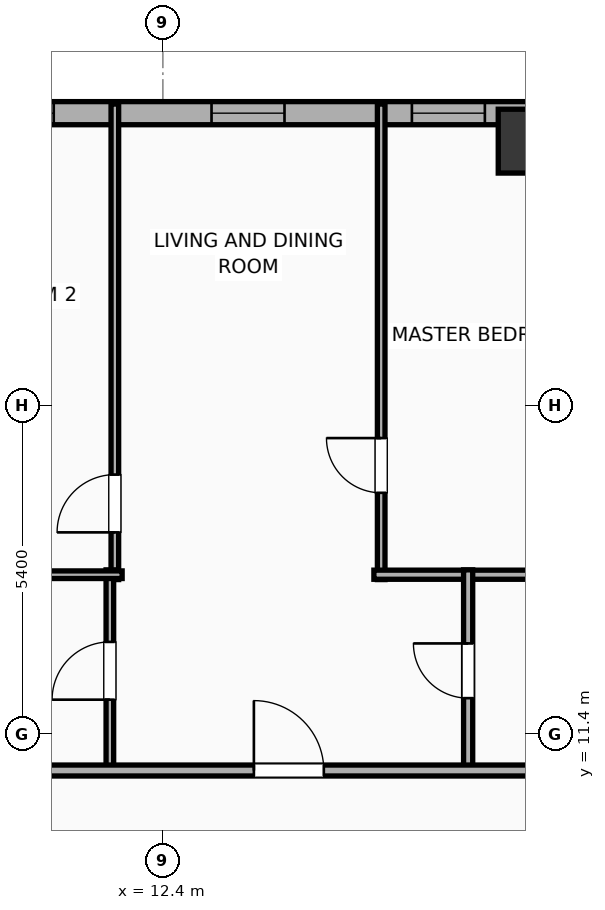
"""IFC4 building model, lengths in metres.
Left out: names, types, materials, properties, quantities, classifications, styles, units other than length and angle.
Written with IfcOpenShell. Run it as: python <this file> out.ifc"""

import sys

from ifc_helpers import new_model, si_unit, direction, frame, frame_2d, origin, origin_2d, place, context, subcontext, project, spatial, rectangle, hollow_rectangle, extrude, element, fill, save


model = new_model("IFC4")
c1 = context("Model", 3, precision=1e-05, world=origin(), true_north=direction((0.0, 1.0)))
c2 = subcontext(c1, "Body", "Model", "MODEL_VIEW")
j1 = project(units=[si_unit("LENGTHUNIT", "METRE"), si_unit("PLANEANGLEUNIT", "RADIAN")], contexts=[c1])
p1 = place(None, origin())
s1 = spatial("IfcSite", under=j1, at=p1, CompositionType="ELEMENT")
p2 = place(p1, origin())
s2 = spatial("IfcBuilding", under=s1, at=p2, CompositionType="ELEMENT")
p3 = place(p2, frame((0.0, 0.0, 132.6)))
s3 = spatial("IfcBuildingStorey", under=s2, at=p3, CompositionType="ELEMENT", Elevation=132.6)
p4 = place(p3, frame((18.44, 21.15, 0.0), z_axis=(0.0, 0.0, 1.0), x_axis=(1.0, 0.0, 0.0)))
e1 = element("IfcColumn", 1, at=p4, inside=s3, PredefinedType="COLUMN", context=c2, shape_type="SweptSolid", body=[
    extrude(hollow_rectangle(XDim=1.05, YDim=1.05, WallThickness=0.036, at=origin_2d()), origin(), (0.0, 0.0, 1.0), 3.9),
])
p5 = place(p3, frame((-25.381, 21.61, 0.0), z_axis=(0.0, 0.0, 1.0), x_axis=(1.0, 0.0, 0.0)))
e2 = element("IfcWall", 2, at=p5, inside=s3, PredefinedType="ELEMENTEDWALL", context=c2, shape_type="SweptSolid", body=[
    extrude(rectangle(XDim=54.763, YDim=0.38, at=frame_2d((27.381, 0.0))), origin(), (0.0, 0.0, 1.0), 3.65),
])
p6 = place(p5, frame((5.645, 0.0, 0.75)))
e3 = element("IfcOpeningElement", 3, at=p6, cuts=e2, PredefinedType="OPENING", context=c2, shape_type="SweptSolid", body=[
    extrude(rectangle(XDim=2.4, YDim=2.1, at=frame_2d((1.2, 1.05))), frame((0.0, 0.2, 0.0), z_axis=(0.0, -1.0, 0.0), x_axis=(1.0, 0.0, 0.0)), (0.0, 0.0, 1.0), 0.4),
])
p7 = place(p5, frame((45.067, 0.0, 0.75)))
e4 = element("IfcOpeningElement", 4, at=p7, cuts=e2, PredefinedType="OPENING", context=c2, shape_type="SweptSolid", body=[
    extrude(rectangle(XDim=2.4, YDim=2.1, at=frame_2d((1.2, 1.05))), frame((0.0, 0.2, 0.0), z_axis=(0.0, -1.0, 0.0), x_axis=(1.0, 0.0, 0.0)), (0.0, 0.0, 1.0), 0.4),
])
p8 = place(p5, frame((1.831, 0.0, 0.75)))
e5 = element("IfcOpeningElement", 5, at=p8, cuts=e2, PredefinedType="OPENING", context=c2, shape_type="SweptSolid", body=[
    extrude(rectangle(XDim=1.2, YDim=2.05, at=frame_2d((0.6, 1.025))), frame((0.0, 0.2, 0.0), z_axis=(0.0, -1.0, 0.0), x_axis=(1.0, 0.0, 0.0)), (0.0, 0.0, 1.0), 0.4),
])
p9 = place(p5, frame((8.996, 0.0, 0.75)))
e6 = element("IfcOpeningElement", 6, at=p9, cuts=e2, PredefinedType="OPENING", context=c2, shape_type="SweptSolid", body=[
    extrude(rectangle(XDim=1.2, YDim=2.05, at=frame_2d((0.6, 1.025))), frame((0.0, 0.2, 0.0), z_axis=(0.0, -1.0, 0.0), x_axis=(1.0, 0.0, 0.0)), (0.0, 0.0, 1.0), 0.4),
])
p10 = place(p5, frame((15.102, 0.0, 0.75)))
e7 = element("IfcOpeningElement", 7, at=p10, cuts=e2, PredefinedType="OPENING", context=c2, shape_type="SweptSolid", body=[
    extrude(rectangle(XDim=1.2, YDim=2.05, at=frame_2d((0.6, 1.025))), frame((0.0, 0.2, 0.0), z_axis=(0.0, -1.0, 0.0), x_axis=(1.0, 0.0, 0.0)), (0.0, 0.0, 1.0), 0.4),
])
p11 = place(p5, frame((12.352, 0.0, 0.75)))
e8 = element("IfcOpeningElement", 8, at=p11, cuts=e2, PredefinedType="OPENING", context=c2, shape_type="SweptSolid", body=[
    extrude(rectangle(XDim=1.2, YDim=2.05, at=frame_2d((0.6, 1.025))), frame((0.0, 0.2, 0.0), z_axis=(0.0, -1.0, 0.0), x_axis=(1.0, 0.0, 0.0)), (0.0, 0.0, 1.0), 0.4),
])
p12 = place(p5, frame((19.936, 0.0, 0.75)))
e9 = element("IfcOpeningElement", 9, at=p12, cuts=e2, PredefinedType="OPENING", context=c2, shape_type="SweptSolid", body=[
    extrude(rectangle(XDim=1.2, YDim=2.05, at=frame_2d((0.6, 1.025))), frame((0.0, 0.2, 0.0), z_axis=(0.0, -1.0, 0.0), x_axis=(1.0, 0.0, 0.0)), (0.0, 0.0, 1.0), 0.4),
])
p13 = place(p5, frame((17.786, 0.0, 0.75)))
e10 = element("IfcOpeningElement", 10, at=p13, cuts=e2, PredefinedType="OPENING", context=c2, shape_type="SweptSolid", body=[
    extrude(rectangle(XDim=1.2, YDim=2.05, at=frame_2d((0.6, 1.025))), frame((0.0, 0.2, 0.0), z_axis=(0.0, -1.0, 0.0), x_axis=(1.0, 0.0, 0.0)), (0.0, 0.0, 1.0), 0.4),
])
p14 = place(p5, frame((23.826, 0.0, 0.75)))
e11 = element("IfcOpeningElement", 11, at=p14, cuts=e2, PredefinedType="OPENING", context=c2, shape_type="SweptSolid", body=[
    extrude(rectangle(XDim=1.2, YDim=2.05, at=frame_2d((0.6, 1.025))), frame((0.0, 0.2, 0.0), z_axis=(0.0, -1.0, 0.0), x_axis=(1.0, 0.0, 0.0)), (0.0, 0.0, 1.0), 0.4),
])
p15 = place(p5, frame((26.576, 0.0, 0.75)))
e12 = element("IfcOpeningElement", 12, at=p15, cuts=e2, PredefinedType="OPENING", context=c2, shape_type="SweptSolid", body=[
    extrude(rectangle(XDim=1.2, YDim=2.05, at=frame_2d((0.6, 1.025))), frame((0.0, 0.2, 0.0), z_axis=(0.0, -1.0, 0.0), x_axis=(1.0, 0.0, 0.0)), (0.0, 0.0, 1.0), 0.4),
])
p16 = place(p5, frame((30.431, 0.0, 0.75)))
e13 = element("IfcOpeningElement", 13, at=p16, cuts=e2, PredefinedType="OPENING", context=c2, shape_type="SweptSolid", body=[
    extrude(rectangle(XDim=1.2, YDim=2.05, at=frame_2d((0.6, 1.025))), frame((0.0, 0.2, 0.0), z_axis=(0.0, -1.0, 0.0), x_axis=(1.0, 0.0, 0.0)), (0.0, 0.0, 1.0), 0.4),
])
p17 = place(p5, frame((38.581, 0.0, 0.75)))
e14 = element("IfcOpeningElement", 14, at=p17, cuts=e2, PredefinedType="OPENING", context=c2, shape_type="SweptSolid", body=[
    extrude(rectangle(XDim=1.2, YDim=2.05, at=frame_2d((0.6, 1.025))), frame((0.0, 0.2, 0.0), z_axis=(0.0, -1.0, 0.0), x_axis=(1.0, 0.0, 0.0)), (0.0, 0.0, 1.0), 0.4),
])
p18 = place(p5, frame((34.786, 0.0, 0.75)))
e15 = element("IfcOpeningElement", 15, at=p18, cuts=e2, PredefinedType="OPENING", context=c2, shape_type="SweptSolid", body=[
    extrude(rectangle(XDim=1.2, YDim=2.05, at=frame_2d((0.6, 1.025))), frame((0.0, 0.2, 0.0), z_axis=(0.0, -1.0, 0.0), x_axis=(1.0, 0.0, 0.0)), (0.0, 0.0, 1.0), 0.4),
])
p19 = place(p5, frame((41.876, 0.0, 0.75)))
e16 = element("IfcOpeningElement", 16, at=p19, cuts=e2, PredefinedType="OPENING", context=c2, shape_type="SweptSolid", body=[
    extrude(rectangle(XDim=1.2, YDim=2.05, at=frame_2d((0.6, 1.025))), frame((0.0, 0.2, 0.0), z_axis=(0.0, -1.0, 0.0), x_axis=(1.0, 0.0, 0.0)), (0.0, 0.0, 1.0), 0.4),
])
p20 = place(p5, frame((49.385, 0.0, 0.75)))
e17 = element("IfcOpeningElement", 17, at=p20, cuts=e2, PredefinedType="OPENING", context=c2, shape_type="SweptSolid", body=[
    extrude(rectangle(XDim=1.2, YDim=2.05, at=frame_2d((0.6, 1.025))), frame((0.0, 0.2, 0.0), z_axis=(0.0, -1.0, 0.0), x_axis=(1.0, 0.0, 0.0)), (0.0, 0.0, 1.0), 0.4),
])
p21 = place(p5, frame((52.181, 0.0, 0.75)))
e18 = element("IfcOpeningElement", 18, at=p21, cuts=e2, PredefinedType="OPENING", context=c2, shape_type="SweptSolid", body=[
    extrude(rectangle(XDim=1.2, YDim=2.05, at=frame_2d((0.6, 1.025))), frame((0.0, 0.2, 0.0), z_axis=(0.0, -1.0, 0.0), x_axis=(1.0, 0.0, 0.0)), (0.0, 0.0, 1.0), 0.4),
])
p22 = place(p3, frame((11.61, 13.94, 0.0), z_axis=(0.0, 0.0, 1.0), x_axis=(0.0, 1.0, 0.0)))
e19 = element("IfcWall", 19, at=p22, inside=s3, PredefinedType="PARTITIONING", context=c2, shape_type="SweptSolid", body=[
    extrude(rectangle(XDim=7.82, YDim=0.125, at=frame_2d((3.91, 0.0))), origin(), (0.0, 0.0, 1.0), 3.65),
])
p23 = place(p22, frame((0.776, 0.0, 0.0)))
e20 = element("IfcOpeningElement", 20, at=p23, cuts=e19, PredefinedType="OPENING", context=c2, shape_type="SweptSolid", body=[
    extrude(rectangle(XDim=0.95, YDim=2.05, at=frame_2d((0.475, 1.025))), frame((0.0, 0.073, 0.0), z_axis=(0.0, -1.0, 0.0), x_axis=(1.0, 0.0, 0.0)), (0.0, 0.0, 1.0), 0.145),
])
p24 = place(p3, frame((15.99, 13.94, 0.0), z_axis=(0.0, 0.0, 1.0), x_axis=(0.0, 1.0, 0.0)))
e21 = element("IfcWall", 21, at=p24, inside=s3, PredefinedType="PARTITIONING", context=c2, shape_type="SweptSolid", body=[
    extrude(rectangle(XDim=7.82, YDim=0.125, at=frame_2d((3.91, 0.0))), origin(), (0.0, 0.0, 1.0), 3.65),
])
p25 = place(p24, frame((1.427, 0.0, 0.0)))
e22 = element("IfcOpeningElement", 22, at=p25, cuts=e21, PredefinedType="OPENING", context=c2, shape_type="SweptSolid", body=[
    extrude(rectangle(XDim=0.9, YDim=2.05, at=frame_2d((0.45, 1.025))), frame((0.0, 0.073, 0.0), z_axis=(0.0, -1.0, 0.0), x_axis=(1.0, 0.0, 0.0)), (0.0, 0.0, 1.0), 0.145),
])
p26 = place(p3, frame((15.87, 14.02, 0.0), z_axis=(0.0, 0.0, 1.0), x_axis=(1.0, 0.0, 0.0)))
e23 = element("IfcWall", 23, at=p26, inside=s3, PredefinedType="PLUMBINGWALL", context=c2, shape_type="SweptSolid", body=[
    extrude(rectangle(XDim=3.605, YDim=0.15, at=frame_2d((1.802, 0.0))), origin(), (0.0, 0.0, 1.0), 3.65),
])
p27 = place(p3, frame((11.528, 10.78, 0.0), z_axis=(0.0, 0.0, 1.0), x_axis=(0.0, 1.0, 0.0)))
e24 = element("IfcWall", 24, at=p27, inside=s3, PredefinedType="PARTITIONING", context=c2, shape_type="SweptSolid", body=[
    extrude(rectangle(XDim=3.32, YDim=0.125, at=frame_2d((1.66, 0.0))), origin(), (0.0, 0.0, 1.0), 3.65),
])
p28 = place(p27, frame((1.185, 0.0, 0.0)))
e25 = element("IfcOpeningElement", 25, at=p28, cuts=e24, PredefinedType="OPENING", context=c2, shape_type="SweptSolid", body=[
    extrude(rectangle(XDim=0.95, YDim=2.05, at=frame_2d((0.475, 1.025))), frame((0.0, 0.073, 0.0), z_axis=(0.0, -1.0, 0.0), x_axis=(1.0, 0.0, 0.0)), (0.0, 0.0, 1.0), 0.145),
])
p29 = place(p3, frame((8.14, 14.02, 0.0), z_axis=(0.0, 0.0, 1.0), x_axis=(1.0, 0.0, 0.0)))
e26 = element("IfcWall", 26, at=p29, inside=s3, PredefinedType="PARTITIONING", context=c2, shape_type="SweptSolid", body=[
    extrude(rectangle(XDim=3.59, YDim=0.125, at=frame_2d((1.795, 0.0))), origin(), (0.0, 0.0, 1.0), 3.65),
])
p30 = place(p3, frame((17.42, 10.78, 0.0), z_axis=(0.0, 0.0, 1.0), x_axis=(0.0, 1.0, 0.0)))
e27 = element("IfcWall", 27, at=p30, inside=s3, PredefinedType="PLUMBINGWALL", context=c2, shape_type="SweptSolid", body=[
    extrude(rectangle(XDim=3.32, YDim=0.15, at=frame_2d((1.66, 0.0))), origin(), (0.0, 0.0, 1.0), 3.65),
])
p31 = place(p30, frame((1.21, 0.0, 0.0)))
e28 = element("IfcOpeningElement", 28, at=p31, cuts=e27, PredefinedType="OPENING", context=c2, shape_type="SweptSolid", body=[
    extrude(rectangle(XDim=0.9, YDim=2.05, at=frame_2d((0.45, 1.025))), frame((0.0, 0.085, 0.0), z_axis=(0.0, -1.0, 0.0), x_axis=(1.0, 0.0, 0.0)), (0.0, 0.0, 1.0), 0.17),
])
p32 = place(p3, frame((-29.21, 10.8, 0.0), z_axis=(0.0, 0.0, 1.0), x_axis=(1.0, 0.0, 0.0)))
e29 = element("IfcWall", 29, at=p32, inside=s3, PredefinedType="PARTITIONING", context=c2, shape_type="SweptSolid", body=[
    extrude(rectangle(XDim=62.42, YDim=0.18, at=frame_2d((31.21, 0.0))), origin(), (0.0, 0.0, 1.0), 3.65),
])
p33 = place(p32, frame((3.457, 0.0, 0.0)))
e30 = element("IfcOpeningElement", 30, at=p33, cuts=e29, PredefinedType="OPENING", context=c2, shape_type="SweptSolid", body=[
    extrude(rectangle(XDim=1.15, YDim=2.05, at=frame_2d((0.575, 1.025))), frame((0.0, 0.1, 0.0), z_axis=(0.0, -1.0, 0.0), x_axis=(1.0, 0.0, 0.0)), (0.0, 0.0, 1.0), 0.2),
])
p34 = place(p32, frame((11.297, 0.0, 0.0)))
e31 = element("IfcOpeningElement", 31, at=p34, cuts=e29, PredefinedType="OPENING", context=c2, shape_type="SweptSolid", body=[
    extrude(rectangle(XDim=1.15, YDim=2.05, at=frame_2d((0.575, 1.025))), frame((0.0, 0.1, 0.0), z_axis=(0.0, -1.0, 0.0), x_axis=(1.0, 0.0, 0.0)), (0.0, 0.0, 1.0), 0.2),
])
p35 = place(p32, frame((18.925, 0.0, 0.0)))
e32 = element("IfcOpeningElement", 32, at=p35, cuts=e29, PredefinedType="OPENING", context=c2, shape_type="SweptSolid", body=[
    extrude(rectangle(XDim=1.15, YDim=2.05, at=frame_2d((0.575, 1.025))), frame((0.0, 0.1, 0.0), z_axis=(0.0, -1.0, 0.0), x_axis=(1.0, 0.0, 0.0)), (0.0, 0.0, 1.0), 0.2),
])
p36 = place(p32, frame((24.362, 0.0, 0.0)))
e33 = element("IfcOpeningElement", 33, at=p36, cuts=e29, PredefinedType="OPENING", context=c2, shape_type="SweptSolid", body=[
    extrude(rectangle(XDim=1.15, YDim=2.05, at=frame_2d((0.575, 1.025))), frame((0.0, 0.1, 0.0), z_axis=(0.0, -1.0, 0.0), x_axis=(1.0, 0.0, 0.0)), (0.0, 0.0, 1.0), 0.2),
])
p37 = place(p32, frame((27.708, 0.0, 0.0)))
e34 = element("IfcOpeningElement", 34, at=p37, cuts=e29, PredefinedType="OPENING", context=c2, shape_type="SweptSolid", body=[
    extrude(rectangle(XDim=1.15, YDim=2.05, at=frame_2d((0.575, 1.025))), frame((0.0, 0.1, 0.0), z_axis=(0.0, -1.0, 0.0), x_axis=(1.0, 0.0, 0.0)), (0.0, 0.0, 1.0), 0.2),
])
p38 = place(p32, frame((34.618, 0.0, 0.0)))
e35 = element("IfcOpeningElement", 35, at=p38, cuts=e29, PredefinedType="OPENING", context=c2, shape_type="SweptSolid", body=[
    extrude(rectangle(XDim=0.9, YDim=2.05, at=frame_2d((0.45, 1.025))), frame((0.0, 0.1, 0.0), z_axis=(0.0, -1.0, 0.0), x_axis=(1.0, 0.0, 0.0)), (0.0, 0.0, 1.0), 0.2),
])
p39 = place(p32, frame((43.106, 0.0, 0.0)))
e36 = element("IfcOpeningElement", 36, at=p39, cuts=e29, PredefinedType="OPENING", context=c2, shape_type="SweptSolid", body=[
    extrude(rectangle(XDim=1.15, YDim=2.05, at=frame_2d((0.575, 1.025))), frame((0.0, 0.1, 0.0), z_axis=(0.0, -1.0, 0.0), x_axis=(1.0, 0.0, 0.0)), (0.0, 0.0, 1.0), 0.2),
])
p40 = place(p32, frame((51.777, 0.0, 0.0)))
e37 = element("IfcOpeningElement", 37, at=p40, cuts=e29, PredefinedType="OPENING", context=c2, shape_type="SweptSolid", body=[
    extrude(rectangle(XDim=0.9, YDim=2.05, at=frame_2d((0.45, 1.025))), frame((0.0, 0.1, 0.0), z_axis=(0.0, -1.0, 0.0), x_axis=(1.0, 0.0, 0.0)), (0.0, 0.0, 1.0), 0.2),
])
p41 = place(p32, frame((58.718, 0.0, 0.0)))
e38 = element("IfcOpeningElement", 38, at=p41, cuts=e29, PredefinedType="OPENING", context=c2, shape_type="SweptSolid", body=[
    extrude(rectangle(XDim=0.9, YDim=2.05, at=frame_2d((0.45, 1.025))), frame((0.0, 0.1, 0.0), z_axis=(0.0, -1.0, 0.0), x_axis=(1.0, 0.0, 0.0)), (0.0, 0.0, 1.0), 0.2),
])
p42 = place(p17, origin())
e39 = element("IfcWindow", 39, at=p42, inside=s3, PartitioningType="SINGLE_PANEL", PredefinedType="WINDOW", context=c2, shape_type="SweptSolid", body=[
    extrude(rectangle(XDim=1.2, YDim=2.05, at=frame_2d((0.6, 1.025))), frame((0.0, 0.03, 0.0), z_axis=(0.0, -1.0, 0.0), x_axis=(1.0, 0.0, 0.0)), (0.0, 0.0, 1.0), 0.06),
])
fill(e14, e39)
p43 = place(p18, origin())
e40 = element("IfcWindow", 40, at=p43, inside=s3, PartitioningType="SINGLE_PANEL", PredefinedType="WINDOW", context=c2, shape_type="SweptSolid", body=[
    extrude(rectangle(XDim=1.2, YDim=2.05, at=frame_2d((0.6, 1.025))), frame((0.0, 0.03, 0.0), z_axis=(0.0, -1.0, 0.0), x_axis=(1.0, 0.0, 0.0)), (0.0, 0.0, 1.0), 0.06),
])
fill(e15, e40)
p44 = place(p19, origin())
e41 = element("IfcWindow", 41, at=p44, inside=s3, PartitioningType="SINGLE_PANEL", PredefinedType="WINDOW", context=c2, shape_type="SweptSolid", body=[
    extrude(rectangle(XDim=1.2, YDim=2.05, at=frame_2d((0.6, 1.025))), frame((0.0, 0.03, 0.0), z_axis=(0.0, -1.0, 0.0), x_axis=(1.0, 0.0, 0.0)), (0.0, 0.0, 1.0), 0.06),
])
fill(e16, e41)
p45 = place(p23, origin())
e42 = element("IfcDoor", 42, at=p45, inside=s3, OperationType="SINGLE_SWING_LEFT", PredefinedType="DOOR", context=c2, shape_type="SweptSolid", body=[
    extrude(rectangle(XDim=0.95, YDim=2.05, at=frame_2d((0.475, 1.025))), frame((0.0, 0.025, 0.0), z_axis=(0.0, -1.0, 0.0), x_axis=(1.0, 0.0, 0.0)), (0.0, 0.0, 1.0), 0.05),
])
fill(e20, e42)
p46 = place(p25, origin())
e43 = element("IfcDoor", 43, at=p46, inside=s3, OperationType="SINGLE_SWING_RIGHT", PredefinedType="DOOR", context=c2, shape_type="SweptSolid", body=[
    extrude(rectangle(XDim=0.9, YDim=2.05, at=frame_2d((0.45, 1.025))), frame((0.0, 0.025, 0.0), z_axis=(0.0, -1.0, 0.0), x_axis=(1.0, 0.0, 0.0)), (0.0, 0.0, 1.0), 0.05),
])
fill(e22, e43)
p47 = place(p28, origin())
e44 = element("IfcDoor", 44, at=p47, inside=s3, OperationType="SINGLE_SWING_LEFT", PredefinedType="DOOR", context=c2, shape_type="SweptSolid", body=[
    extrude(rectangle(XDim=0.95, YDim=2.05, at=frame_2d((0.475, 1.025))), frame((0.0, 0.025, 0.0), z_axis=(0.0, -1.0, 0.0), x_axis=(1.0, 0.0, 0.0)), (0.0, 0.0, 1.0), 0.05),
])
fill(e25, e44)
p48 = place(p31, origin())
e45 = element("IfcDoor", 45, at=p48, inside=s3, OperationType="SINGLE_SWING_RIGHT", PredefinedType="DOOR", context=c2, shape_type="SweptSolid", body=[
    extrude(rectangle(XDim=0.9, YDim=2.05, at=frame_2d((0.45, 1.025))), frame((0.0, 0.025, 0.0), z_axis=(0.0, -1.0, 0.0), x_axis=(1.0, 0.0, 0.0)), (0.0, 0.0, 1.0), 0.05),
])
fill(e28, e45)
p49 = place(p39, origin())
e46 = element("IfcDoor", 46, at=p49, inside=s3, OperationType="SINGLE_SWING_LEFT", PredefinedType="DOOR", context=c2, shape_type="SweptSolid", body=[
    extrude(rectangle(XDim=1.15, YDim=2.05, at=frame_2d((0.575, 1.025))), frame((0.0, 0.025, 0.0), z_axis=(0.0, -1.0, 0.0), x_axis=(1.0, 0.0, 0.0)), (0.0, 0.0, 1.0), 0.05),
])
fill(e36, e46)
save(model, sys.argv[1])
